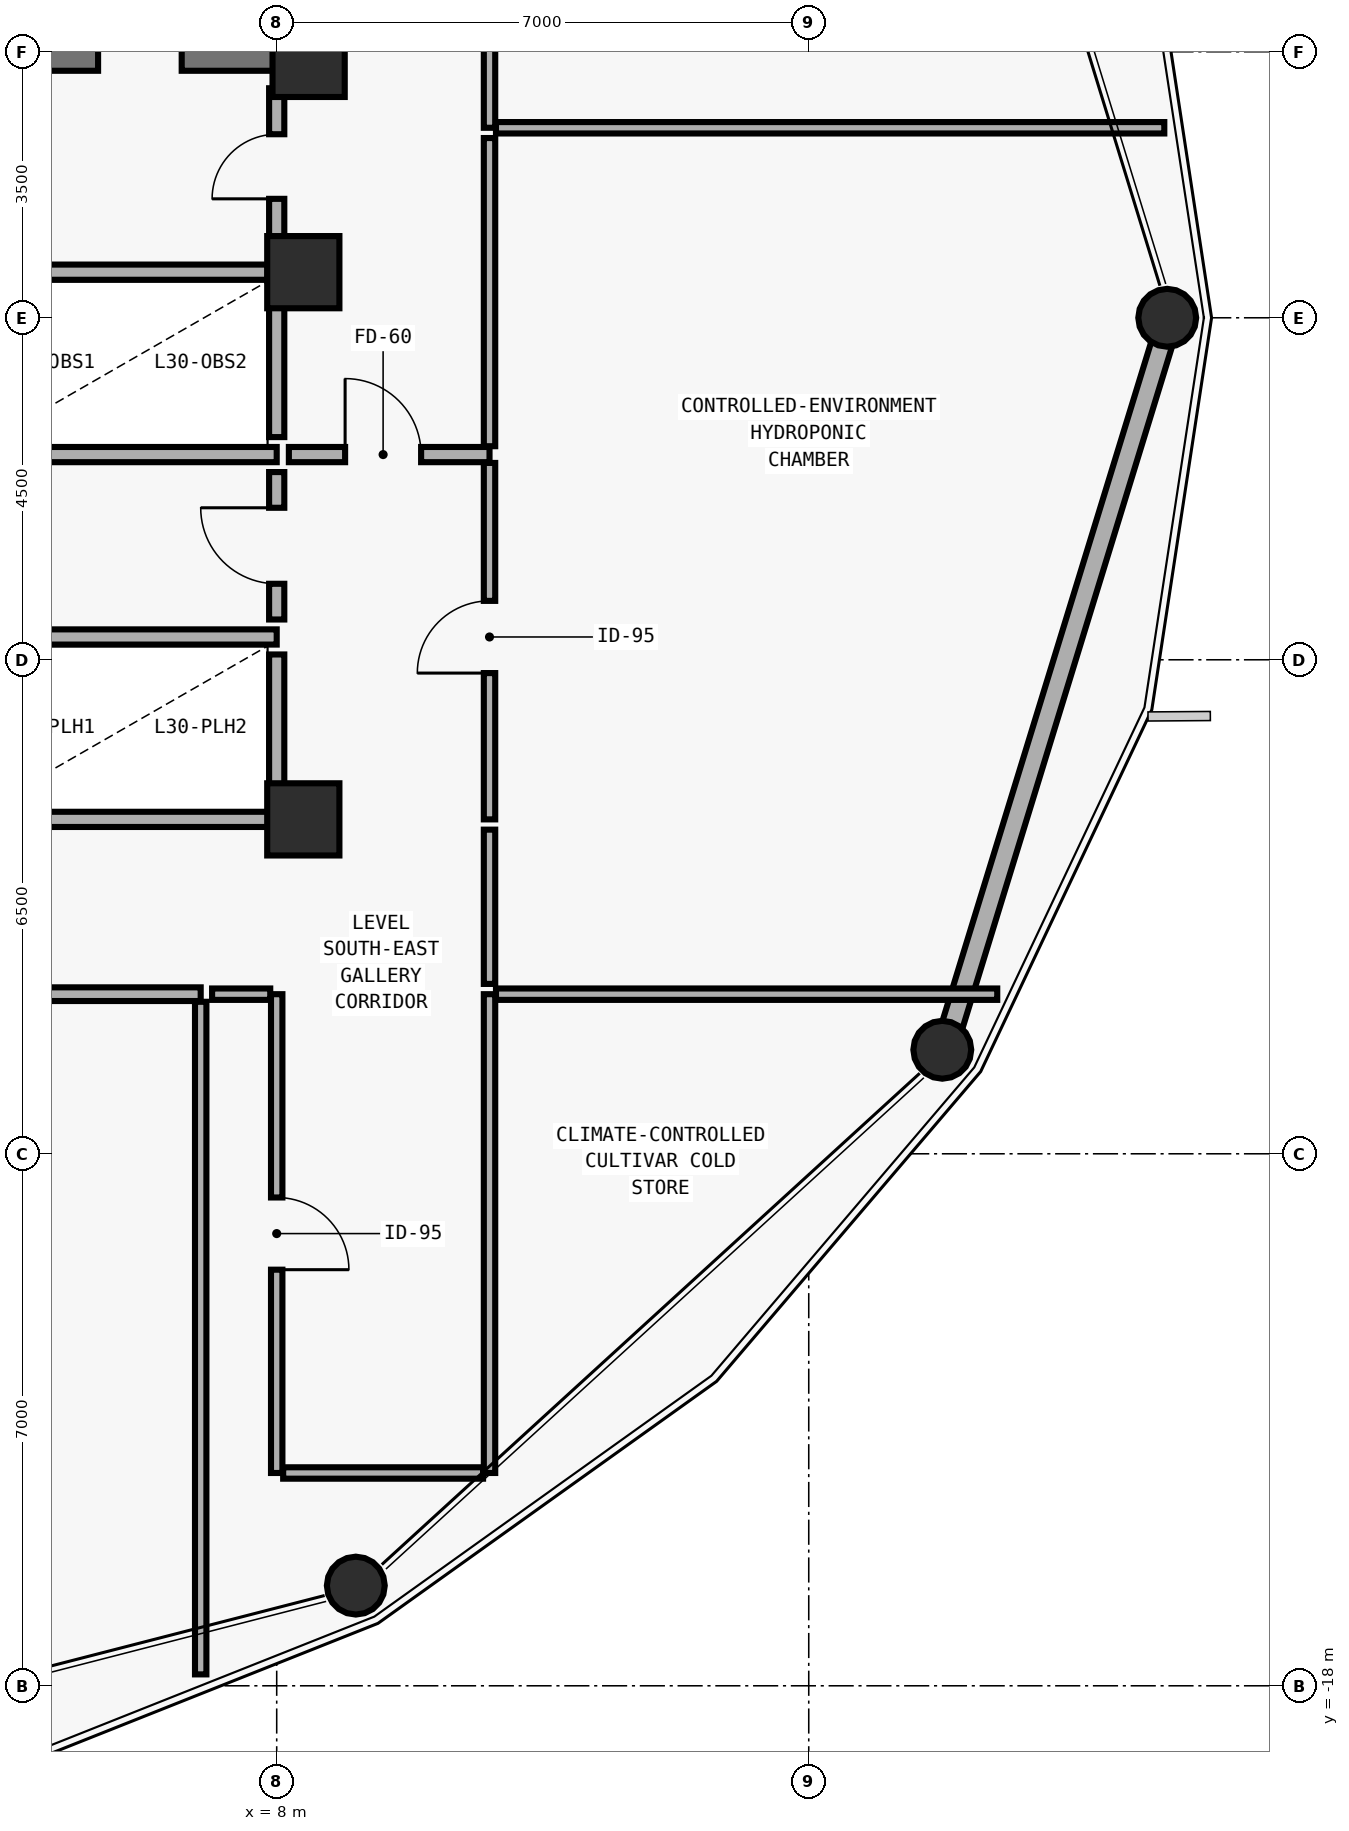
"""IFC4 building model, lengths in metres.
Left out: names, types, materials, properties, quantities, classifications, styles, units other than length and angle.
Written with IfcOpenShell. Run it as: python <this file> out.ifc"""

import sys

from ifc_helpers import new_model, si_unit, direction, frame, frame_2d, origin, origin_2d, place, context, subcontext, project, spatial, rectangle, hollow_circle, extrude, element, fill, save


model = new_model("IFC4")
c1 = context("Model", 3, precision=1e-05, world=origin(), true_north=direction((0.0, 1.0)))
c2 = subcontext(c1, "Body", "Model", "MODEL_VIEW")
j1 = project(units=[si_unit("LENGTHUNIT", "METRE"), si_unit("PLANEANGLEUNIT", "RADIAN")], contexts=[c1])
p1 = place(None, origin())
s1 = spatial("IfcSite", under=j1, at=p1, CompositionType="ELEMENT")
p2 = place(p1, origin())
s2 = spatial("IfcBuilding", under=s1, at=p2, CompositionType="ELEMENT")
p3 = place(p2, frame((0.0, 0.0, 122.7)))
s3 = spatial("IfcBuildingStorey", under=s2, at=p3, CompositionType="ELEMENT", Elevation=122.7)
p4 = place(p3, frame((-2.0, 3.5, 0.0), z_axis=(0.0, 0.0, 1.0), x_axis=(1.0, 0.0, 0.0)))
e1 = element("IfcWall", 1, at=p4, inside=s3, PredefinedType="SHEAR", context=c2, shape_type="SweptSolid", body=[
    extrude(rectangle(XDim=10.0, YDim=0.5, at=frame_2d((5.0, 0.0))), origin(), (0.0, 0.0, 1.0), 3.892),
])
p5 = place(p4, frame((1.65, 0.0, 0.0)))
e2 = element("IfcOpeningElement", 2, at=p5, cuts=e1, PredefinedType="OPENING", context=c2, shape_type="SweptSolid", body=[
    extrude(rectangle(XDim=1.1, YDim=2.15, at=frame_2d((0.55, 1.075))), frame((0.0, 0.26, 0.0), z_axis=(0.0, -1.0, 0.0), x_axis=(1.0, 0.0, 0.0)), (0.0, 0.0, 1.0), 0.52),
])
p6 = place(p4, frame((7.65, 0.0, 0.0)))
e3 = element("IfcOpeningElement", 3, at=p6, cuts=e1, PredefinedType="OPENING", context=c2, shape_type="SweptSolid", body=[
    extrude(rectangle(XDim=1.1, YDim=2.15, at=frame_2d((0.55, 1.075))), frame((0.0, 0.26, 0.0), z_axis=(0.0, -1.0, 0.0), x_axis=(1.0, 0.0, 0.0)), (0.0, 0.0, 1.0), 0.52),
])
p7 = place(p4, frame((3.72, 0.0, 0.0)))
e4 = element("IfcOpeningElement", 4, at=p7, cuts=e1, PredefinedType="OPENING", context=c2, shape_type="SweptSolid", body=[
    extrude(rectangle(XDim=1.1, YDim=2.2, at=frame_2d((0.55, 1.1))), frame((0.0, 0.26, 0.0), z_axis=(0.0, -1.0, 0.0), x_axis=(1.0, 0.0, 0.0)), (0.0, 0.0, 1.0), 0.52),
])
p8 = place(p4, frame((5.18, 0.0, 0.0)))
e5 = element("IfcOpeningElement", 5, at=p8, cuts=e1, PredefinedType="OPENING", context=c2, shape_type="SweptSolid", body=[
    extrude(rectangle(XDim=1.1, YDim=2.2, at=frame_2d((0.55, 1.1))), frame((0.0, 0.26, 0.0), z_axis=(0.0, -1.0, 0.0), x_axis=(1.0, 0.0, 0.0)), (0.0, 0.0, 1.0), 0.52),
])
for number, where, z_axis, x_axis in (
    (6, (8.42, 3.38, 0.0), (0.0, 0.0, 1.0), (1.0, 0.0, 0.0)),
    (7, (8.35, 0.6, 0.0), (0.0, 0.0, 1.0), (1.0, 0.0, 0.0)),
    (8, (8.35, -6.6, 0.0), (0.0, 0.0, 1.0), (1.0, 0.0, 0.0)),
):
    element("IfcColumn", number, at=place(p3, frame(where, z_axis=z_axis, x_axis=x_axis)), inside=s3, PredefinedType="COLUMN", context=c2, shape_type="SweptSolid", body=[
        extrude(rectangle(XDim=0.95, YDim=0.95, at=origin_2d()), origin(), (0.0, 0.0, 1.0), 3.875),
    ])
p9 = place(p3, frame((19.75, 0.0, 0.0), z_axis=(-0.017260533083, 0.0, 0.999851025902), x_axis=(0.0, -1.0, 0.0)))
e9 = element("IfcColumn", 9, at=p9, inside=s3, PredefinedType="COLUMN", context=c2, shape_type="SweptSolid", body=[
    extrude(hollow_circle(Radius=0.381, WallThickness=0.028, at=origin_2d()), origin(), (0.0, 0.0, 1.0), 3.875),
])
p10 = place(p3, frame((9.058, -16.702, 0.0), z_axis=(-0.008693752408, 0.010457702172, 0.999907523291), x_axis=(-0.768980150656, -0.639272655365, 0.0)))
e10 = element("IfcColumn", 10, at=p10, inside=s3, PredefinedType="COLUMN", context=c2, shape_type="SweptSolid", body=[
    extrude(hollow_circle(Radius=0.381, WallThickness=0.028, at=origin_2d()), origin(), (0.0, 0.0, 1.0), 3.875),
])
p11 = place(p3, frame((16.786, -9.643, 0.0), z_axis=(-0.01499299424, 0.00611059009, 0.999868926816), x_axis=(-0.377420478288, -0.926041998275, 0.0)))
e11 = element("IfcColumn", 11, at=p11, inside=s3, PredefinedType="COLUMN", context=c2, shape_type="SweptSolid", body=[
    extrude(hollow_circle(Radius=0.381, WallThickness=0.028, at=origin_2d()), origin(), (0.0, 0.0, 1.0), 3.875),
])
p12 = place(p3, frame((19.651, -0.321, 0.0), z_axis=(0.0, 0.0, 1.0), x_axis=(-0.293816185851, -0.955861940309, 0.0)))
e12 = element("IfcWall", 12, at=p12, inside=s3, PredefinedType="SOLIDWALL", context=c2, shape_type="SweptSolid", body=[
    extrude(rectangle(XDim=9.416, YDim=0.28, at=frame_2d((4.708, 0.0))), origin(), (0.0, 0.0, 1.0), 3.16),
])
p13 = place(p3, frame((4.0, 0.6, 0.0), z_axis=(0.0, 0.0, 1.0), x_axis=(1.0, 0.0, 0.0)))
e13 = element("IfcWall", 13, at=p13, inside=s3, PredefinedType="SOLIDWALL", context=c2, shape_type="SweptSolid", body=[
    extrude(rectangle(XDim=3.88, YDim=0.2, at=frame_2d((1.94, 0.0))), origin(), (0.0, 0.0, 1.0), 3.222),
])
p14 = place(p3, frame((4.0, -1.8, 0.0), z_axis=(0.0, 0.0, 1.0), x_axis=(1.0, 0.0, 0.0)))
e14 = element("IfcWall", 14, at=p14, inside=s3, PredefinedType="SOLIDWALL", context=c2, shape_type="SweptSolid", body=[
    extrude(rectangle(XDim=4.0, YDim=0.2, at=frame_2d((2.0, 0.0))), origin(), (0.0, 0.0, 1.0), 3.64),
])
p15 = place(p3, frame((8.0, -1.57, 0.0), z_axis=(0.0, 0.0, 1.0), x_axis=(0.0, 1.0, 0.0)))
e15 = element("IfcWall", 15, at=p15, inside=s3, PredefinedType="SOLIDWALL", context=c2, shape_type="SweptSolid", body=[
    extrude(rectangle(XDim=2.05, YDim=0.2, at=frame_2d((1.025, 0.0))), origin(), (0.0, 0.0, 1.0), 3.072),
])
p16 = place(p3, frame((4.16, -4.2, 0.0), z_axis=(0.0, 0.0, 1.0), x_axis=(1.0, 0.0, 0.0)))
e16 = element("IfcWall", 16, at=p16, inside=s3, PredefinedType="SOLIDWALL", context=c2, shape_type="SweptSolid", body=[
    extrude(rectangle(XDim=3.84, YDim=0.2, at=frame_2d((1.92, 0.0))), origin(), (0.0, 0.0, 1.0), 3.64),
])
p17 = place(p3, frame((4.16, -6.6, 0.0), z_axis=(0.0, 0.0, 1.0), x_axis=(1.0, 0.0, 0.0)))
e17 = element("IfcWall", 17, at=p17, inside=s3, PredefinedType="SOLIDWALL", context=c2, shape_type="SweptSolid", body=[
    extrude(rectangle(XDim=3.84, YDim=0.2, at=frame_2d((1.92, 0.0))), origin(), (0.0, 0.0, 1.0), 3.222),
])
p18 = place(p3, frame((8.0, -6.37, 0.0), z_axis=(0.0, 0.0, 1.0), x_axis=(0.0, 1.0, 0.0)))
e18 = element("IfcWall", 18, at=p18, inside=s3, PredefinedType="SOLIDWALL", context=c2, shape_type="SweptSolid", body=[
    extrude(rectangle(XDim=1.94, YDim=0.2, at=frame_2d((0.97, 0.0))), origin(), (0.0, 0.0, 1.0), 3.072),
])
p19 = place(p3, frame((8.0, 0.72, 0.0), z_axis=(0.0, 0.0, 1.0), x_axis=(0.0, 1.0, 0.0)))
e19 = element("IfcWall", 19, at=p19, inside=s3, PredefinedType="MOVABLE", context=c2, shape_type="SweptSolid", body=[
    extrude(rectangle(XDim=2.3, YDim=0.2, at=frame_2d((1.15, 0.0))), origin(), (0.0, 0.0, 1.0), 2.872),
])
p20 = place(p19, frame((0.845, 0.0, 0.0)))
e20 = element("IfcOpeningElement", 20, at=p20, cuts=e19, PredefinedType="OPENING", context=c2, shape_type="SweptSolid", body=[
    extrude(rectangle(XDim=0.85, YDim=2.1, at=frame_2d((0.425, 1.05))), frame((0.0, 0.11, 0.0), z_axis=(0.0, -1.0, 0.0), x_axis=(1.0, 0.0, 0.0)), (0.0, 0.0, 1.0), 0.22),
])
p21 = place(p3, frame((8.0, -3.97, 0.0), z_axis=(0.0, 0.0, 1.0), x_axis=(0.0, 1.0, 0.0)))
e21 = element("IfcWall", 21, at=p21, inside=s3, PredefinedType="MOVABLE", context=c2, shape_type="SweptSolid", body=[
    extrude(rectangle(XDim=1.94, YDim=0.2, at=frame_2d((0.97, 0.0))), origin(), (0.0, 0.0, 1.0), 3.072),
])
p22 = place(p21, frame((0.47, 0.0, 0.0)))
e22 = element("IfcOpeningElement", 22, at=p22, cuts=e21, PredefinedType="OPENING", context=c2, shape_type="SweptSolid", body=[
    extrude(rectangle(XDim=1.0, YDim=2.1, at=frame_2d((0.5, 1.05))), frame((0.0, 0.11, 0.0), z_axis=(0.0, -1.0, 0.0), x_axis=(1.0, 0.0, 0.0)), (0.0, 0.0, 1.0), 0.22),
])
p23 = place(p3, frame((8.16, -1.8, 0.0), z_axis=(0.0, 0.0, 1.0), x_axis=(1.0, 0.0, 0.0)))
e23 = element("IfcWall", 23, at=p23, inside=s3, PredefinedType="MOVABLE", context=c2, shape_type="SweptSolid", body=[
    extrude(rectangle(XDim=2.64, YDim=0.2, at=frame_2d((1.32, 0.0))), origin(), (0.0, 0.0, 1.0), 3.64),
])
p24 = place(p23, frame((0.74, 0.0, 0.0)))
e24 = element("IfcOpeningElement", 24, at=p24, cuts=e23, PredefinedType="OPENING", context=c2, shape_type="SweptSolid", body=[
    extrude(rectangle(XDim=1.0, YDim=2.1, at=frame_2d((0.5, 1.05))), frame((0.0, 0.11, 0.0), z_axis=(0.0, -1.0, 0.0), x_axis=(1.0, 0.0, 0.0)), (0.0, 0.0, 1.0), 0.22),
])
p25 = place(p3, frame((-1.365, -8.9, 0.0), z_axis=(0.0, 0.0, 1.0), x_axis=(1.0, 0.0, 0.0)))
e25 = element("IfcWall", 25, at=p25, inside=s3, PredefinedType="PLUMBINGWALL", context=c2, shape_type="SweptSolid", body=[
    extrude(rectangle(XDim=8.365, YDim=0.18, at=frame_2d((4.183, 0.0))), origin(), (0.0, 0.0, 1.0), 3.64),
])
p26 = place(p25, frame((3.64, 0.0, 0.0)))
e26 = element("IfcOpeningElement", 26, at=p26, cuts=e25, PredefinedType="OPENING", context=c2, shape_type="SweptSolid", body=[
    extrude(rectangle(XDim=0.95, YDim=2.1, at=frame_2d((0.475, 1.05))), frame((0.0, 0.1, 0.0), z_axis=(0.0, -1.0, 0.0), x_axis=(1.0, 0.0, 0.0)), (0.0, 0.0, 1.0), 0.2),
])
p27 = place(p3, frame((8.0, -8.9, 0.0), z_axis=(0.0, 0.0, 1.0), x_axis=(0.0, -1.0, 0.0)))
e27 = element("IfcWall", 27, at=p27, inside=s3, PredefinedType="PARTITIONING", context=c2, shape_type="SweptSolid", body=[
    extrude(rectangle(XDim=6.3, YDim=0.15, at=frame_2d((3.15, 0.0))), origin(), (0.0, 0.0, 1.0), 3.072),
])
p28 = place(p27, frame((2.675, 0.0, 0.0)))
e28 = element("IfcOpeningElement", 28, at=p28, cuts=e27, PredefinedType="OPENING", context=c2, shape_type="SweptSolid", body=[
    extrude(rectangle(XDim=0.95, YDim=2.1, at=frame_2d((0.475, 1.05))), frame((0.0, 0.085, 0.0), z_axis=(0.0, -1.0, 0.0), x_axis=(1.0, 0.0, 0.0)), (0.0, 0.0, 1.0), 0.17),
])
p29 = place(p3, frame((10.8, -6.6, 0.0), z_axis=(0.0, 0.0, 1.0), x_axis=(0.0, 1.0, 0.0)))
e29 = element("IfcWall", 29, at=p29, inside=s3, PredefinedType="PARTITIONING", context=c2, shape_type="SweptSolid", body=[
    extrude(rectangle(XDim=4.69, YDim=0.15, at=frame_2d((2.345, 0.0))), origin(), (0.0, 0.0, 1.0), 3.64),
])
p30 = place(p29, frame((1.925, 0.0, 0.0)))
e30 = element("IfcOpeningElement", 30, at=p30, cuts=e29, PredefinedType="OPENING", context=c2, shape_type="SweptSolid", body=[
    extrude(rectangle(XDim=0.95, YDim=2.1, at=frame_2d((0.475, 1.05))), frame((0.0, 0.085, 0.0), z_axis=(0.0, -1.0, 0.0), x_axis=(1.0, 0.0, 0.0)), (0.0, 0.0, 1.0), 0.17),
])
p31 = place(p3, frame((10.8, 2.5, 0.0), z_axis=(0.0, 0.0, 1.0), x_axis=(0.0, 1.0, 0.0)))
e31 = element("IfcWall", 31, at=p31, inside=s3, PredefinedType="PARTITIONING", context=c2, shape_type="SweptSolid", body=[
    extrude(rectangle(XDim=10.0, YDim=0.15, at=frame_2d((5.0, 0.0))), origin(), (0.0, 0.0, 1.0), 3.64),
])
p32 = place(p31, frame((4.525, 0.0, 0.0)))
e32 = element("IfcOpeningElement", 32, at=p32, cuts=e31, PredefinedType="OPENING", context=c2, shape_type="SweptSolid", body=[
    extrude(rectangle(XDim=0.95, YDim=2.1, at=frame_2d((0.475, 1.05))), frame((0.0, 0.085, 0.0), z_axis=(0.0, -1.0, 0.0), x_axis=(1.0, 0.0, 0.0)), (0.0, 0.0, 1.0), 0.17),
])
p33 = place(p3, frame((7.0, -9.0, 0.0), z_axis=(0.0, 0.0, 1.0), x_axis=(0.0, -1.0, 0.0)))
e33 = element("IfcWall", 33, at=p33, inside=s3, PredefinedType="PARTITIONING", context=c2, shape_type="SweptSolid", body=[
    extrude(rectangle(XDim=8.85, YDim=0.15, at=frame_2d((4.425, 0.0))), origin(), (0.0, 0.0, 1.0), 3.64),
])
p34 = place(p3, frame((10.8, -15.2, 0.0), z_axis=(0.0, 0.0, 1.0), x_axis=(0.0, 1.0, 0.0)))
e34 = element("IfcWall", 34, at=p34, inside=s3, PredefinedType="PARTITIONING", context=c2, shape_type="SweptSolid", body=[
    extrude(rectangle(XDim=6.3, YDim=0.15, at=frame_2d((3.15, 0.0))), origin(), (0.0, 0.0, 1.0), 3.64),
])
p35 = place(p3, frame((8.085, -15.2, 0.0), z_axis=(0.0, 0.0, 1.0), x_axis=(1.0, 0.0, 0.0)))
e35 = element("IfcWall", 35, at=p35, inside=s3, PredefinedType="PARTITIONING", context=c2, shape_type="SweptSolid", body=[
    extrude(rectangle(XDim=2.63, YDim=0.15, at=frame_2d((1.315, 0.0))), origin(), (0.0, 0.0, 1.0), 3.64),
])
p36 = place(p3, frame((7.15, -8.9, 0.0), z_axis=(0.0, 0.0, 1.0), x_axis=(1.0, 0.0, 0.0)))
e36 = element("IfcWall", 36, at=p36, inside=s3, PredefinedType="PARTITIONING", context=c2, shape_type="SweptSolid", body=[
    extrude(rectangle(XDim=0.765, YDim=0.15, at=frame_2d((0.383, 0.0))), origin(), (0.0, 0.0, 1.0), 3.64),
])
p37 = place(p3, frame((10.885, -8.9, 0.0), z_axis=(0.0, 0.0, 1.0), x_axis=(1.0, 0.0, 0.0)))
e37 = element("IfcWall", 37, at=p37, inside=s3, PredefinedType="PARTITIONING", context=c2, shape_type="SweptSolid", body=[
    extrude(rectangle(XDim=6.595, YDim=0.15, at=frame_2d((3.297, 0.0))), origin(), (0.0, 0.0, 1.0), 3.072),
])
p38 = place(p3, frame((10.8, -8.765, 0.0), z_axis=(0.0, 0.0, 1.0), x_axis=(0.0, 1.0, 0.0)))
e38 = element("IfcWall", 38, at=p38, inside=s3, PredefinedType="PARTITIONING", context=c2, shape_type="SweptSolid", body=[
    extrude(rectangle(XDim=2.03, YDim=0.15, at=frame_2d((1.015, 0.0))), origin(), (0.0, 0.0, 1.0), 3.64),
])
p39 = place(p3, frame((10.8, -1.69, 0.0), z_axis=(0.0, 0.0, 1.0), x_axis=(0.0, 1.0, 0.0)))
e39 = element("IfcWall", 39, at=p39, inside=s3, PredefinedType="PARTITIONING", context=c2, shape_type="SweptSolid", body=[
    extrude(rectangle(XDim=4.055, YDim=0.15, at=frame_2d((2.027, 0.0))), origin(), (0.0, 0.0, 1.0), 3.64),
])
p40 = place(p3, frame((10.885, 2.5, 0.0), z_axis=(0.0, 0.0, 1.0), x_axis=(1.0, 0.0, 0.0)))
e40 = element("IfcWall", 40, at=p40, inside=s3, PredefinedType="PARTITIONING", context=c2, shape_type="SweptSolid", body=[
    extrude(rectangle(XDim=8.793, YDim=0.15, at=frame_2d((4.396, 0.0))), origin(), (0.0, 0.0, 1.0), 3.64),
])
p41 = place(p6, origin())
e41 = element("IfcDoor", 41, at=p41, inside=s3, OperationType="SINGLE_SWING_RIGHT", PredefinedType="DOOR", context=c2, shape_type="SweptSolid", body=[
    extrude(rectangle(XDim=1.1, YDim=2.15, at=frame_2d((0.55, 1.075))), frame((0.0, 0.025, 0.0), z_axis=(0.0, -1.0, 0.0), x_axis=(1.0, 0.0, 0.0)), (0.0, 0.0, 1.0), 0.05),
])
fill(e3, e41)
p42 = place(p20, origin())
e42 = element("IfcDoor", 42, at=p42, inside=s3, OperationType="SINGLE_SWING_LEFT", PredefinedType="DOOR", context=c2, shape_type="SweptSolid", body=[
    extrude(rectangle(XDim=0.85, YDim=2.1, at=frame_2d((0.425, 1.05))), frame((0.0, 0.025, 0.0), z_axis=(0.0, -1.0, 0.0), x_axis=(1.0, 0.0, 0.0)), (0.0, 0.0, 1.0), 0.05),
])
fill(e20, e42)
p43 = place(p22, origin())
e43 = element("IfcDoor", 43, at=p43, inside=s3, OperationType="SINGLE_SWING_RIGHT", PredefinedType="DOOR", context=c2, shape_type="SweptSolid", body=[
    extrude(rectangle(XDim=1.0, YDim=2.1, at=frame_2d((0.5, 1.05))), frame((0.0, 0.025, 0.0), z_axis=(0.0, -1.0, 0.0), x_axis=(1.0, 0.0, 0.0)), (0.0, 0.0, 1.0), 0.05),
])
fill(e22, e43)
p44 = place(p24, origin())
e44 = element("IfcDoor", 44, at=p44, inside=s3, OperationType="SINGLE_SWING_LEFT", PredefinedType="DOOR", context=c2, shape_type="SweptSolid", body=[
    extrude(rectangle(XDim=1.0, YDim=2.1, at=frame_2d((0.5, 1.05))), frame((0.0, 0.025, 0.0), z_axis=(0.0, -1.0, 0.0), x_axis=(1.0, 0.0, 0.0)), (0.0, 0.0, 1.0), 0.05),
])
fill(e24, e44)
p45 = place(p28, origin())
e45 = element("IfcDoor", 45, at=p45, inside=s3, OperationType="SINGLE_SWING_RIGHT", PredefinedType="DOOR", context=c2, shape_type="SweptSolid", body=[
    extrude(rectangle(XDim=0.95, YDim=2.1, at=frame_2d((0.475, 1.05))), frame((0.0, 0.025, 0.0), z_axis=(0.0, -1.0, 0.0), x_axis=(1.0, 0.0, 0.0)), (0.0, 0.0, 1.0), 0.05),
])
fill(e28, e45)
p46 = place(p30, origin())
e46 = element("IfcDoor", 46, at=p46, inside=s3, OperationType="SINGLE_SWING_LEFT", PredefinedType="DOOR", context=c2, shape_type="SweptSolid", body=[
    extrude(rectangle(XDim=0.95, YDim=2.1, at=frame_2d((0.475, 1.05))), frame((0.0, 0.025, 0.0), z_axis=(0.0, -1.0, 0.0), x_axis=(1.0, 0.0, 0.0)), (0.0, 0.0, 1.0), 0.05),
])
fill(e30, e46)
save(model, sys.argv[1])
